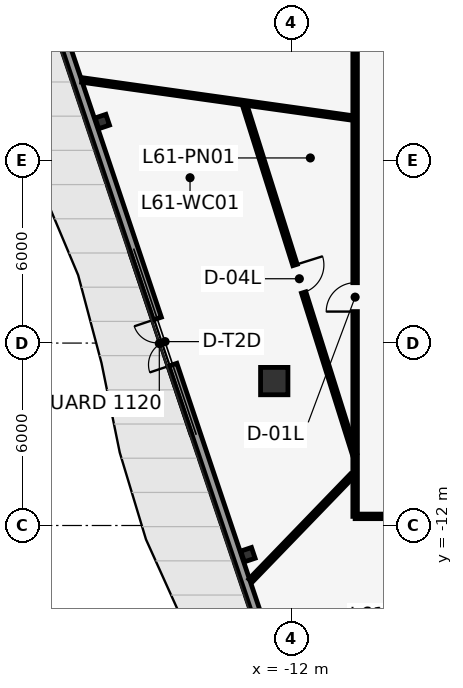
"""IFC4 building model, lengths in metres.
Left out: names, types, materials, properties, quantities, classifications, styles, units other than length and angle.
Written with IfcOpenShell. Run it as: python <this file> out.ifc"""

import sys

from ifc_helpers import new_model, si_unit, direction, frame, frame_2d, origin, origin_2d, place, context, subcontext, project, spatial, rectangle, i_section, extrude, element, fill, save


model = new_model("IFC4")
c1 = context("Model", 3, precision=1e-05, world=origin(), true_north=direction((0.0, 1.0)))
c2 = subcontext(c1, "Body", "Model", "MODEL_VIEW")
j1 = project(units=[si_unit("LENGTHUNIT", "METRE"), si_unit("PLANEANGLEUNIT", "RADIAN")], contexts=[c1])
p1 = place(None, origin())
s1 = spatial("IfcSite", under=j1, at=p1, CompositionType="ELEMENT")
p2 = place(p1, origin())
s2 = spatial("IfcBuilding", under=s1, at=p2, CompositionType="ELEMENT")
p3 = place(p2, frame((0.0, 0.0, 260.9)))
s3 = spatial("IfcBuildingStorey", under=s2, at=p3, CompositionType="ELEMENT", Elevation=260.9)
p4 = place(p3, frame((-12.56, -7.25, 0.0), z_axis=(0.0, 0.0, 1.0), x_axis=(1.0, 0.0, 0.0)))
e1 = element("IfcColumn", 1, at=p4, inside=s3, PredefinedType="COLUMN", context=c2, shape_type="SweptSolid", body=[
    extrude(rectangle(XDim=0.9, YDim=0.9, at=origin_2d()), origin(), (0.0, 0.0, 1.0), 4.6),
])
for number, where, z_axis, x_axis in (
    (2, (-18.215, 1.286, 0.0), (0.0, 0.0, 1.0), (-0.319, 0.948, 0.0)),
    (3, (-13.426, -12.959, 0.0), (0.0, 0.0, 1.0), (-0.319, 0.948, 0.0)),
):
    element("IfcColumn", number, at=place(p3, frame(where, z_axis=z_axis, x_axis=x_axis)), inside=s3, PredefinedType="COLUMN", context=c2, shape_type="SweptSolid", body=[
        extrude(i_section(OverallWidth=0.373, OverallDepth=0.373, WebThickness=0.016, FlangeThickness=0.026, at=origin_2d()), origin(), (0.0, 0.0, 1.0), 4.6),
    ])
p5 = place(p3, frame((-8.79, -27.828, 0.0), z_axis=(0.0, 0.0, 1.0), x_axis=(-0.318898365887, 0.947788917552, 0.0)))
e4 = element("IfcWall", 4, at=p5, inside=s3, PredefinedType="STANDARD", context=c2, shape_type="SweptSolid", body=[
    extrude(rectangle(XDim=46.163, YDim=0.28, at=frame_2d((23.081, 0.0))), origin(), (0.0, 0.0, 1.0), 4.35),
])
p6 = place(p5, frame((22.281, 0.0, 0.0)))
e5 = element("IfcOpeningElement", 5, at=p6, cuts=e4, PredefinedType="OPENING", context=c2, shape_type="SweptSolid", body=[
    extrude(rectangle(XDim=1.6, YDim=2.2, at=frame_2d((0.8, 1.1))), frame((0.0, 0.15, 0.0), z_axis=(0.0, -1.0, 0.0), x_axis=(1.0, 0.0, 0.0)), (0.0, 0.0, 1.0), 0.3),
])
p7 = place(p5, frame((5.731, 0.0, 0.85)))
e6 = element("IfcOpeningElement", 6, at=p7, cuts=e4, PredefinedType="OPENING", context=c2, shape_type="SweptSolid", body=[
    extrude(rectangle(XDim=1.1, YDim=2.15, at=frame_2d((0.55, 1.075))), frame((0.0, 0.15, 0.0), z_axis=(0.0, -1.0, 0.0), x_axis=(1.0, 0.0, 0.0)), (0.0, 0.0, 1.0), 0.3),
])
p8 = place(p5, frame((11.331, 0.0, 0.85)))
e7 = element("IfcOpeningElement", 7, at=p8, cuts=e4, PredefinedType="OPENING", context=c2, shape_type="SweptSolid", body=[
    extrude(rectangle(XDim=1.1, YDim=2.15, at=frame_2d((0.55, 1.075))), frame((0.0, 0.15, 0.0), z_axis=(0.0, -1.0, 0.0), x_axis=(1.0, 0.0, 0.0)), (0.0, 0.0, 1.0), 0.3),
])
p9 = place(p5, frame((33.731, 0.0, 0.85)))
e8 = element("IfcOpeningElement", 8, at=p9, cuts=e4, PredefinedType="OPENING", context=c2, shape_type="SweptSolid", body=[
    extrude(rectangle(XDim=1.1, YDim=2.15, at=frame_2d((0.55, 1.075))), frame((0.0, 0.15, 0.0), z_axis=(0.0, -1.0, 0.0), x_axis=(1.0, 0.0, 0.0)), (0.0, 0.0, 1.0), 0.3),
])
p10 = place(p5, frame((39.331, 0.0, 0.85)))
e9 = element("IfcOpeningElement", 9, at=p10, cuts=e4, PredefinedType="OPENING", context=c2, shape_type="SweptSolid", body=[
    extrude(rectangle(XDim=1.1, YDim=2.15, at=frame_2d((0.55, 1.075))), frame((0.0, 0.15, 0.0), z_axis=(0.0, -1.0, 0.0), x_axis=(1.0, 0.0, 0.0)), (0.0, 0.0, 1.0), 0.3),
])
p11 = place(p3, frame((-4.53, -11.7, 0.0), z_axis=(0.0, 0.0, 1.0), x_axis=(-1.0, 0.0, 0.0)))
e10 = element("IfcWall", 10, at=p11, inside=s3, PredefinedType="PARTITIONING", context=c2, shape_type="SweptSolid", body=[
    extrude(rectangle(XDim=5.37, YDim=0.15, at=frame_2d((2.685, 0.0))), origin(), (0.0, 0.0, 1.0), 4.35),
])
p12 = place(p3, frame((-9.9, -11.7, 0.0), z_axis=(0.0, 0.0, 1.0), x_axis=(0.0, 1.0, 0.0)))
e11 = element("IfcWall", 11, at=p12, inside=s3, PredefinedType="PARTITIONING", context=c2, shape_type="SweptSolid", body=[
    extrude(rectangle(XDim=23.55, YDim=0.15, at=frame_2d((11.775, 0.0))), origin(), (0.0, 0.0, 1.0), 4.35),
])
p13 = place(p12, frame((6.736, 0.0, 0.0)))
e12 = element("IfcOpeningElement", 12, at=p13, cuts=e11, PredefinedType="OPENING", context=c2, shape_type="SweptSolid", body=[
    extrude(rectangle(XDim=0.95, YDim=2.15, at=frame_2d((0.475, 1.075))), frame((0.0, 0.085, 0.0), z_axis=(0.0, -1.0, 0.0), x_axis=(1.0, 0.0, 0.0)), (0.0, 0.0, 1.0), 0.17),
])
p14 = place(p12, frame((17.724, 0.0, 0.0)))
e13 = element("IfcOpeningElement", 13, at=p14, cuts=e11, PredefinedType="OPENING", context=c2, shape_type="SweptSolid", body=[
    extrude(rectangle(XDim=0.95, YDim=2.15, at=frame_2d((0.475, 1.075))), frame((0.0, 0.085, 0.0), z_axis=(0.0, -1.0, 0.0), x_axis=(1.0, 0.0, 0.0)), (0.0, 0.0, 1.0), 0.17),
])
p15 = place(p3, frame((-10.005, 1.406, 0.0), z_axis=(0.0, 0.0, 1.0), x_axis=(-0.990266668464, 0.139183064089, 0.0)))
e14 = element("IfcWall", 14, at=p15, inside=s3, PredefinedType="PARTITIONING", context=c2, shape_type="SweptSolid", body=[
    extrude(rectangle(XDim=8.965, YDim=0.15, at=frame_2d((4.482, 0.0))), origin(), (0.0, 0.0, 1.0), 4.35),
])
p16 = place(p3, frame((-10.005, -10.361, 0.0), z_axis=(0.0, 0.0, 1.0), x_axis=(-0.694673426667, -0.719325260423, 0.0)))
e15 = element("IfcWall", 15, at=p16, inside=s3, PredefinedType="PARTITIONING", context=c2, shape_type="SweptSolid", body=[
    extrude(rectangle(XDim=4.803, YDim=0.15, at=frame_2d((2.402, 0.0))), origin(), (0.0, 0.0, 1.0), 4.35),
])
p17 = place(p3, frame((-13.549, 1.879, 0.0), z_axis=(0.0, 0.0, 1.0), x_axis=(0.300333532513, -0.953834246213, 0.0)))
e16 = element("IfcWall", 16, at=p17, inside=s3, PredefinedType="PARTITIONING", context=c2, shape_type="SweptSolid", body=[
    extrude(rectangle(XDim=12.084, YDim=0.15, at=frame_2d((6.042, 0.0))), origin(), (0.0, 0.0, 1.0), 4.35),
])
p18 = place(p17, frame((5.567, 0.0, 0.0)))
e17 = element("IfcOpeningElement", 17, at=p18, cuts=e16, PredefinedType="OPENING", context=c2, shape_type="SweptSolid", body=[
    extrude(rectangle(XDim=0.95, YDim=2.15, at=frame_2d((0.475, 1.075))), frame((0.0, 0.085, 0.0), z_axis=(0.0, -1.0, 0.0), x_axis=(1.0, 0.0, 0.0)), (0.0, 0.0, 1.0), 0.17),
])
p19 = place(p6, origin())
e18 = element("IfcDoor", 18, at=p19, inside=s3, OperationType="DOUBLE_DOOR_SINGLE_SWING", PredefinedType="DOOR", context=c2, shape_type="SweptSolid", body=[
    extrude(rectangle(XDim=1.6, YDim=2.2, at=frame_2d((0.8, 1.1))), frame((0.0, 0.025, 0.0), z_axis=(0.0, -1.0, 0.0), x_axis=(1.0, 0.0, 0.0)), (0.0, 0.0, 1.0), 0.05),
])
fill(e5, e18)
p20 = place(p18, origin())
e19 = element("IfcDoor", 19, at=p20, inside=s3, OperationType="SINGLE_SWING_LEFT", PredefinedType="DOOR", context=c2, shape_type="SweptSolid", body=[
    extrude(rectangle(XDim=0.95, YDim=2.15, at=frame_2d((0.475, 1.075))), frame((0.0, 0.025, 0.0), z_axis=(0.0, -1.0, 0.0), x_axis=(1.0, 0.0, 0.0)), (0.0, 0.0, 1.0), 0.05),
])
fill(e17, e19)
p21 = place(p13, origin())
e20 = element("IfcDoor", 20, at=p21, inside=s3, OperationType="SINGLE_SWING_LEFT", PredefinedType="DOOR", context=c2, shape_type="SweptSolid", body=[
    extrude(rectangle(XDim=0.95, YDim=2.15, at=frame_2d((0.475, 1.075))), frame((0.0, 0.025, 0.0), z_axis=(0.0, -1.0, 0.0), x_axis=(1.0, 0.0, 0.0)), (0.0, 0.0, 1.0), 0.05),
])
fill(e12, e20)
save(model, sys.argv[1])
